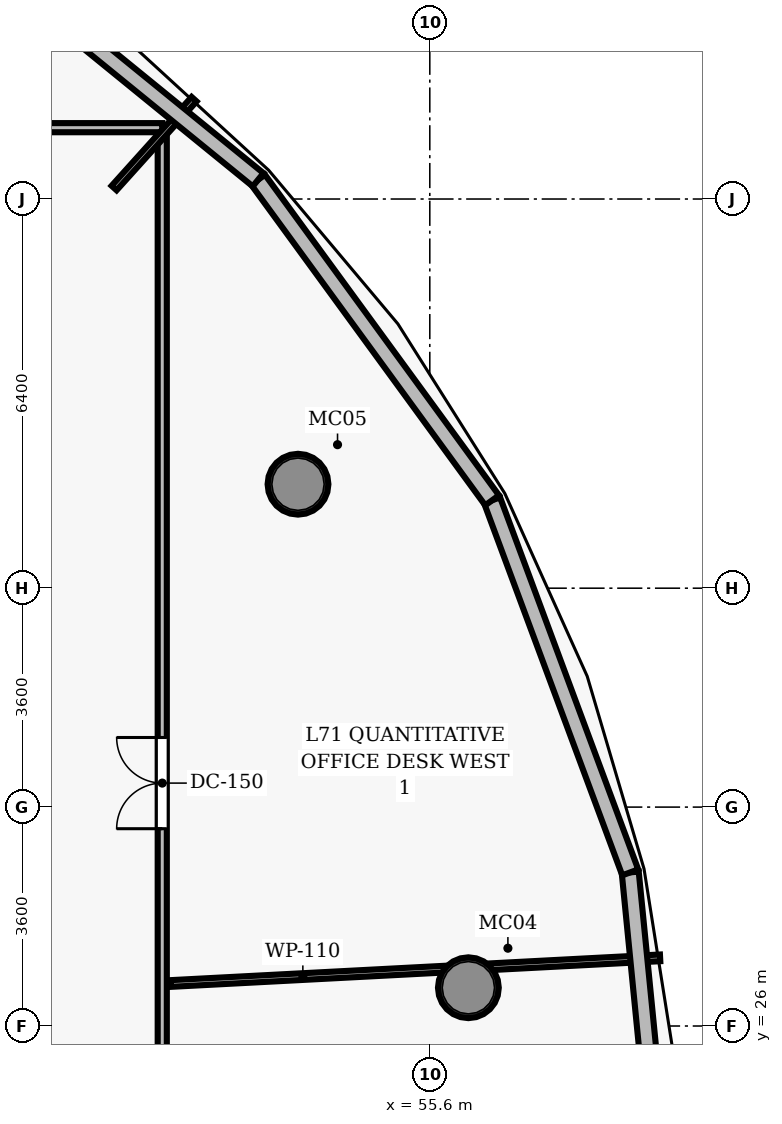
"""IFC4 building model, lengths in metres.
Left out: names, types, materials, properties, quantities, classifications, styles, units other than length and angle.
Written with IfcOpenShell. Run it as: python <this file> out.ifc"""

import sys

from ifc_helpers import new_model, si_unit, direction, frame, frame_2d, origin, origin_2d, place, context, subcontext, project, spatial, rectangle, hollow_circle, extrude, element, fill, save


model = new_model("IFC4")
c1 = context("Model", 3, precision=1e-05, world=origin(), true_north=direction((0.0, 1.0)))
c2 = subcontext(c1, "Body", "Model", "MODEL_VIEW")
j1 = project(units=[si_unit("LENGTHUNIT", "METRE"), si_unit("PLANEANGLEUNIT", "RADIAN")], contexts=[c1])
p1 = place(None, origin())
s1 = spatial("IfcSite", under=j1, at=p1, CompositionType="ELEMENT")
p2 = place(p1, origin())
s2 = spatial("IfcBuilding", under=s1, at=p2, CompositionType="ELEMENT")
p3 = place(p2, frame((0.0, 0.0, 280.55)))
s3 = spatial("IfcBuildingStorey", under=s2, at=p3, CompositionType="ELEMENT", Elevation=280.55)
for number, where, z_axis, x_axis in (
    (1, (56.235, 26.629, 0.0), (0.0, 0.0, 1.0), (1.0, 0.0, 0.0)),
    (2, (53.433, 34.91, 0.0), (0.0, 0.0, 1.0), (1.0, 0.0, 0.0)),
):
    element("IfcColumn", number, at=place(p3, frame(where, z_axis=z_axis, x_axis=x_axis)), inside=s3, PredefinedType="COLUMN", context=c2, shape_type="SweptSolid", body=[
        extrude(hollow_circle(Radius=0.5, WallThickness=0.045, at=origin_2d()), origin(), (0.0, 0.0, 1.0), 3.85),
    ])
p4 = place(p3, frame((51.2, 10.6, 0.0), z_axis=(0.0, 0.0, 1.0), x_axis=(0.0, 1.0, 0.0)))
e3 = element("IfcWall", 3, at=p4, inside=s3, PredefinedType="PARTITIONING", context=c2, shape_type="SweptSolid", body=[
    extrude(rectangle(XDim=30.173, YDim=0.15, at=frame_2d((15.086, 0.0))), origin(), (0.0, 0.0, 1.0), 3.04),
])
p5 = place(p4, frame((18.645, 0.0, 0.0)))
e4 = element("IfcOpeningElement", 4, at=p5, cuts=e3, PredefinedType="OPENING", context=c2, shape_type="SweptSolid", body=[
    extrude(rectangle(XDim=1.5, YDim=2.2, at=frame_2d((0.75, 1.1))), frame((0.0, 0.085, 0.0), z_axis=(0.0, -1.0, 0.0), x_axis=(1.0, 0.0, 0.0)), (0.0, 0.0, 1.0), 0.17),
])
p6 = place(p4, frame((11.261, 0.0, 0.0)))
e5 = element("IfcOpeningElement", 5, at=p6, cuts=e3, PredefinedType="OPENING", context=c2, shape_type="SweptSolid", body=[
    extrude(rectangle(XDim=0.95, YDim=2.15, at=frame_2d((0.475, 1.075))), frame((0.0, 0.085, 0.0), z_axis=(0.0, -1.0, 0.0), x_axis=(1.0, 0.0, 0.0)), (0.0, 0.0, 1.0), 0.17),
])
p7 = place(p3, frame((49.1, 40.773, 0.0), z_axis=(0.0, 0.0, 1.0), x_axis=(1.0, 0.0, 0.0)))
e6 = element("IfcWall", 6, at=p7, inside=s3, PredefinedType="PARTITIONING", context=c2, shape_type="SweptSolid", body=[
    extrude(rectangle(XDim=2.1, YDim=0.15, at=frame_2d((1.05, 0.0))), origin(), (0.0, 0.0, 1.0), 3.04),
])
p8 = place(p3, frame((51.34, 26.699, 0.0), z_axis=(0.0, 0.0, 1.0), x_axis=(0.998630437158, 0.052318734528, 0.0)))
e7 = element("IfcWall", 7, at=p8, inside=s3, PredefinedType="PARTITIONING", context=c2, shape_type="SweptSolid", body=[
    extrude(rectangle(XDim=8.059, YDim=0.11, at=frame_2d((4.029, 0.0))), origin(), (0.0, 0.0, 1.0), 3.04),
])
p9 = place(p3, frame((50.408, 39.781, 0.0), z_axis=(0.0, 0.0, 1.0), x_axis=(0.66912938547, 0.743145924769, 0.0)))
e8 = element("IfcWall", 8, at=p9, inside=s3, PredefinedType="PARTITIONING", context=c2, shape_type="SweptSolid", body=[
    extrude(rectangle(XDim=1.966, YDim=0.11, at=frame_2d((0.983, 0.0))), origin(), (0.0, 0.0, 1.0), 3.04),
])
p10 = place(p3, frame((58.896, 28.526, 0.0), z_axis=(0.0, 0.0, 1.0), x_axis=(0.098348049648, -0.995152079398, 0.0)))
e9 = element("IfcWall", 9, at=p10, inside=s3, PredefinedType="SOLIDWALL", context=c2, shape_type="SweptSolid", body=[
    extrude(rectangle(XDim=6.526, YDim=0.28, at=frame_2d((3.263, 0.0))), origin(), (0.0, 0.0, 1.0), 3.625),
])
p11 = place(p3, frame((56.625, 34.645, 0.0), z_axis=(0.0, 0.0, 1.0), x_axis=(0.348051289259, -0.937475493037, 0.0)))
e10 = element("IfcWall", 10, at=p11, inside=s3, PredefinedType="SOLIDWALL", context=c2, shape_type="SweptSolid", body=[
    extrude(rectangle(XDim=6.527, YDim=0.28, at=frame_2d((3.264, 0.0))), origin(), (0.0, 0.0, 1.0), 3.625),
])
p12 = place(p3, frame((52.776, 39.917, 0.0), z_axis=(0.0, 0.0, 1.0), x_axis=(0.589632000938, -0.807672027168, 0.0)))
e11 = element("IfcWall", 11, at=p12, inside=s3, PredefinedType="SOLIDWALL", context=c2, shape_type="SweptSolid", body=[
    extrude(rectangle(XDim=6.527, YDim=0.28, at=frame_2d((3.263, 0.0))), origin(), (0.0, 0.0, 1.0), 3.625),
])
p13 = place(p3, frame((47.715, 44.037, 0.0), z_axis=(0.0, 0.0, 1.0), x_axis=(0.775574781084, -0.63125570013, 0.0)))
e12 = element("IfcWall", 12, at=p13, inside=s3, PredefinedType="SOLIDWALL", context=c2, shape_type="SweptSolid", body=[
    extrude(rectangle(XDim=6.526, YDim=0.28, at=frame_2d((3.263, 0.0))), origin(), (0.0, 0.0, 1.0), 3.625),
])
p14 = place(p5, origin())
e13 = element("IfcDoor", 13, at=p14, inside=s3, OperationType="DOUBLE_DOOR_SINGLE_SWING", PredefinedType="DOOR", context=c2, shape_type="SweptSolid", body=[
    extrude(rectangle(XDim=1.5, YDim=2.2, at=frame_2d((0.75, 1.1))), frame((0.0, 0.025, 0.0), z_axis=(0.0, -1.0, 0.0), x_axis=(1.0, 0.0, 0.0)), (0.0, 0.0, 1.0), 0.05),
])
fill(e4, e13)
save(model, sys.argv[1])
